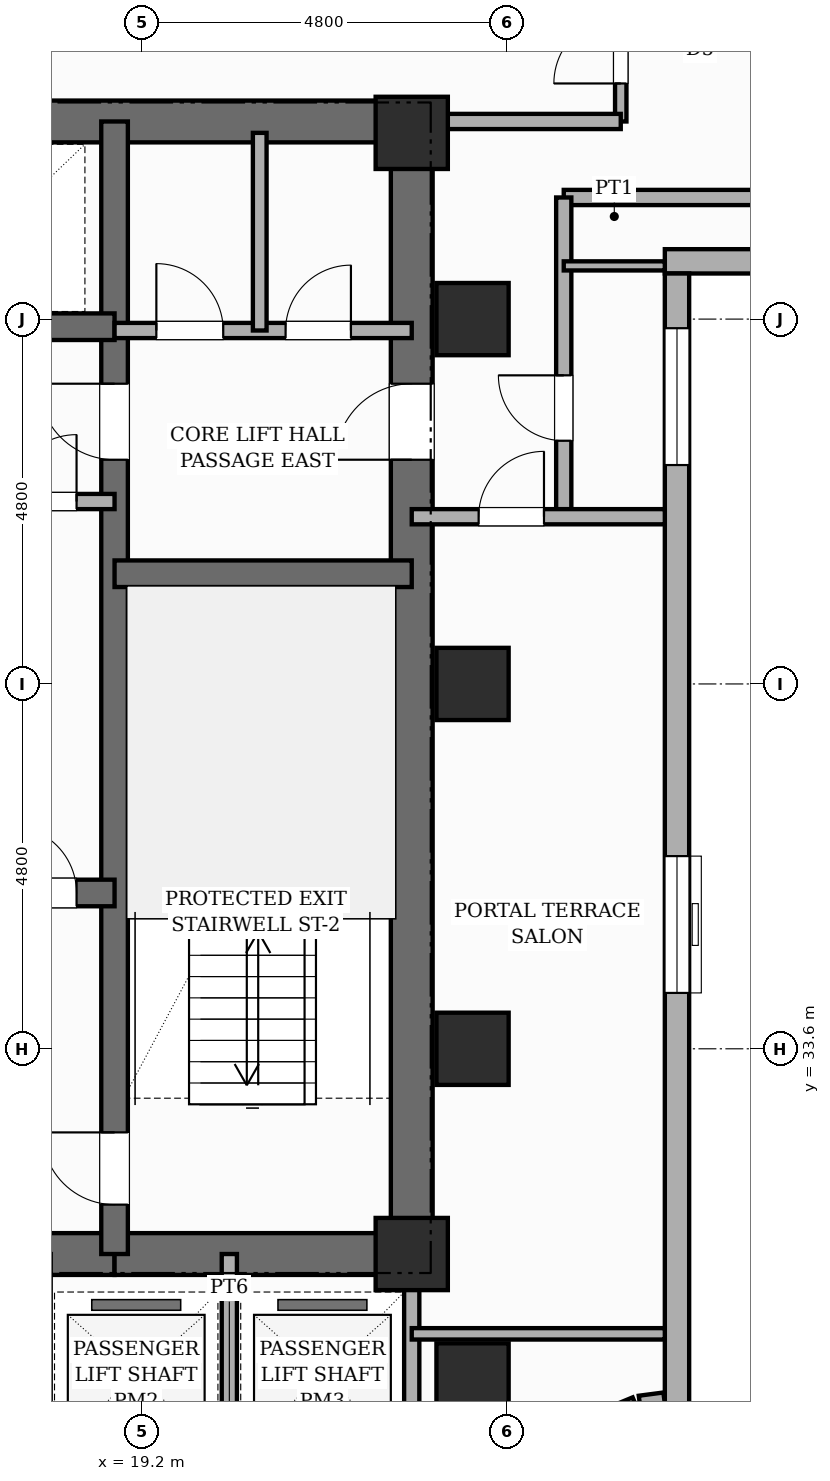
"""IFC4 building model, lengths in metres.
Left out: names, types, materials, properties, quantities, classifications, styles, units other than length and angle.
Written with IfcOpenShell. Run it as: python <this file> out.ifc"""

import sys

from ifc_helpers import new_model, si_unit, direction, frame, frame_2d, origin, origin_2d, place, context, subcontext, project, spatial, rectangle, extrude, element, fill, save


model = new_model("IFC4")
c1 = context("Model", 3, precision=1e-05, world=origin(), true_north=direction((0.0, 1.0)))
c2 = subcontext(c1, "Body", "Model", "MODEL_VIEW")
j1 = project(units=[si_unit("LENGTHUNIT", "METRE"), si_unit("PLANEANGLEUNIT", "RADIAN")], contexts=[c1])
p1 = place(None, origin())
s1 = spatial("IfcSite", under=j1, at=p1, CompositionType="ELEMENT")
p2 = place(p1, origin())
s2 = spatial("IfcBuilding", under=s1, at=p2, CompositionType="ELEMENT")
p3 = place(p2, frame((0.0, 0.0, 107.2)))
s3 = spatial("IfcBuildingStorey", under=s2, at=p3, CompositionType="ELEMENT", Elevation=107.2)
p4 = place(p3, frame((22.75, 30.625, 0.0), z_axis=(0.0, 0.0, 1.0), x_axis=(0.0, 1.0, 0.0)))
e1 = element("IfcWall", 1, at=p4, inside=s3, PredefinedType="SHEAR", context=c2, shape_type="SweptSolid", body=[
    extrude(rectangle(XDim=15.45, YDim=0.55, at=frame_2d((7.725, 0.0))), origin(), (0.0, 0.0, 1.0), 3.6),
])
p5 = place(p4, frame((10.725, 0.0, 0.0)))
e2 = element("IfcOpeningElement", 2, at=p5, cuts=e1, PredefinedType="OPENING", context=c2, shape_type="SweptSolid", body=[
    extrude(rectangle(XDim=1.0, YDim=2.15, at=frame_2d((0.5, 1.075))), frame((0.0, 0.285, 0.0), z_axis=(0.0, -1.0, 0.0), x_axis=(1.0, 0.0, 0.0)), (0.0, 0.0, 1.0), 0.57),
])
p6 = place(p3, frame((6.05, 45.8, 0.0), z_axis=(0.0, 0.0, 1.0), x_axis=(1.0, 0.0, 0.0)))
e3 = element("IfcWall", 3, at=p6, inside=s3, PredefinedType="SHEAR", context=c2, shape_type="SweptSolid", body=[
    extrude(rectangle(XDim=16.7, YDim=0.55, at=frame_2d((8.35, 0.0))), origin(), (0.0, 0.0, 1.0), 3.6),
])
p7 = place(p3, frame((9.96, 30.9, 0.0), z_axis=(0.0, 0.0, 1.0), x_axis=(1.0, 0.0, 0.0)))
e4 = element("IfcWall", 4, at=p7, inside=s3, PredefinedType="SHEAR", context=c2, shape_type="SweptSolid", body=[
    extrude(rectangle(XDim=8.88, YDim=0.55, at=frame_2d((4.44, 0.0))), origin(), (0.0, 0.0, 1.0), 3.6),
])
p8 = place(p7, frame((4.09, 0.0, 0.0)))
e5 = element("IfcOpeningElement", 5, at=p8, cuts=e4, PredefinedType="OPENING", context=c2, shape_type="SweptSolid", body=[
    extrude(rectangle(XDim=1.0, YDim=2.15, at=frame_2d((0.5, 1.075))), frame((0.0, 0.285, 0.0), z_axis=(0.0, -1.0, 0.0), x_axis=(1.0, 0.0, 0.0)), (0.0, 0.0, 1.0), 0.57),
])
p9 = place(p3, frame((18.84, 30.9, 0.0), z_axis=(0.0, 0.0, 1.0), x_axis=(1.0, 0.0, 0.0)))
e6 = element("IfcWall", 6, at=p9, inside=s3, PredefinedType="SHEAR", context=c2, shape_type="SweptSolid", body=[
    extrude(rectangle(XDim=3.91, YDim=0.55, at=frame_2d((1.955, 0.0))), origin(), (0.0, 0.0, 1.0), 3.6),
])
p10 = place(p3, frame((18.84, 30.9, 0.0), z_axis=(0.0, 0.0, 1.0), x_axis=(0.0, 1.0, 0.0)))
e7 = element("IfcWall", 7, at=p10, inside=s3, PredefinedType="SHEAR", context=c2, shape_type="SweptSolid", body=[
    extrude(rectangle(XDim=14.9, YDim=0.35, at=frame_2d((7.45, 0.0))), origin(), (0.0, 0.0, 1.0), 3.6),
])
p11 = place(p10, frame((0.65, 0.0, 0.0)))
e8 = element("IfcOpeningElement", 8, at=p11, cuts=e7, PredefinedType="OPENING", context=c2, shape_type="SweptSolid", body=[
    extrude(rectangle(XDim=0.95, YDim=2.1, at=frame_2d((0.475, 1.05))), frame((0.0, 0.185, 0.0), z_axis=(0.0, -1.0, 0.0), x_axis=(1.0, 0.0, 0.0)), (0.0, 0.0, 1.0), 0.37),
])
p12 = place(p10, frame((10.45, 0.0, 0.0)))
e9 = element("IfcOpeningElement", 9, at=p12, cuts=e7, PredefinedType="OPENING", context=c2, shape_type="SweptSolid", body=[
    extrude(rectangle(XDim=1.0, YDim=2.15, at=frame_2d((0.5, 1.075))), frame((0.0, 0.185, 0.0), z_axis=(0.0, -1.0, 0.0), x_axis=(1.0, 0.0, 0.0)), (0.0, 0.0, 1.0), 0.37),
])
p13 = place(p3, frame((18.84, 39.85, 0.0), z_axis=(0.0, 0.0, 1.0), x_axis=(1.0, 0.0, 0.0)))
e10 = element("IfcWall", 10, at=p13, inside=s3, PredefinedType="SHEAR", context=c2, shape_type="SweptSolid", body=[
    extrude(rectangle(XDim=3.91, YDim=0.35, at=frame_2d((1.955, 0.0))), origin(), (0.0, 0.0, 1.0), 3.6),
])
p14 = place(p3, frame((9.96, 35.65, 0.0), z_axis=(0.0, 0.0, 1.0), x_axis=(1.0, 0.0, 0.0)))
e11 = element("IfcWall", 11, at=p14, inside=s3, PredefinedType="SHEAR", context=c2, shape_type="SweptSolid", body=[
    extrude(rectangle(XDim=8.88, YDim=0.35, at=frame_2d((4.44, 0.0))), origin(), (0.0, 0.0, 1.0), 3.6),
])
p15 = place(p14, frame((0.84, 0.0, 0.0)))
e12 = element("IfcOpeningElement", 12, at=p15, cuts=e11, PredefinedType="OPENING", context=c2, shape_type="SweptSolid", body=[
    extrude(rectangle(XDim=1.1, YDim=2.15, at=frame_2d((0.55, 1.075))), frame((0.0, 0.185, 0.0), z_axis=(0.0, -1.0, 0.0), x_axis=(1.0, 0.0, 0.0)), (0.0, 0.0, 1.0), 0.37),
])
p16 = place(p14, frame((5.24, 0.0, 0.0)))
e13 = element("IfcOpeningElement", 13, at=p16, cuts=e11, PredefinedType="OPENING", context=c2, shape_type="SweptSolid", body=[
    extrude(rectangle(XDim=1.1, YDim=2.15, at=frame_2d((0.55, 1.075))), frame((0.0, 0.185, 0.0), z_axis=(0.0, -1.0, 0.0), x_axis=(1.0, 0.0, 0.0)), (0.0, 0.0, 1.0), 0.37),
])
p17 = place(p14, frame((7.5, 0.0, 0.0)))
e14 = element("IfcOpeningElement", 14, at=p17, cuts=e11, PredefinedType="OPENING", context=c2, shape_type="SweptSolid", body=[
    extrude(rectangle(XDim=0.88, YDim=2.1, at=frame_2d((0.44, 1.05))), frame((0.0, 0.185, 0.0), z_axis=(0.0, -1.0, 0.0), x_axis=(1.0, 0.0, 0.0)), (0.0, 0.0, 1.0), 0.37),
])
p18 = place(p3, frame((9.96, 43.1, 0.0), z_axis=(0.0, 0.0, 1.0), x_axis=(1.0, 0.0, 0.0)))
e15 = element("IfcWall", 15, at=p18, inside=s3, PredefinedType="SHEAR", context=c2, shape_type="SweptSolid", body=[
    extrude(rectangle(XDim=8.88, YDim=0.35, at=frame_2d((4.44, 0.0))), origin(), (0.0, 0.0, 1.0), 3.6),
])
for number, where, z_axis, x_axis in (
    (16, (22.75, 30.9, 0.0), (0.0, 0.0, 1.0), (1.0, 0.0, 0.0)),
    (17, (22.75, 45.65, 0.0), (0.0, 0.0, 1.0), (1.0, 0.0, 0.0)),
    (18, (23.55, 29.25, 0.0), (0.0, 0.0, 1.0), (1.0, 0.0, 0.0)),
    (19, (23.55, 33.6, 0.0), (0.0, 0.0, 1.0), (1.0, 0.0, 0.0)),
    (20, (23.55, 38.4, 0.0), (0.0, 0.0, 1.0), (1.0, 0.0, 0.0)),
    (21, (23.55, 43.2, 0.0), (0.0, 0.0, 1.0), (1.0, 0.0, 0.0)),
):
    element("IfcColumn", number, at=place(p3, frame(where, z_axis=z_axis, x_axis=x_axis)), inside=s3, PredefinedType="COLUMN", context=c2, shape_type="SweptSolid", body=[
        extrude(rectangle(XDim=0.95, YDim=0.95, at=origin_2d()), origin(), (0.0, 0.0, 1.0), 3.6),
    ])
p19 = place(p3, frame((38.4, 43.96, 0.0), z_axis=(0.0, 0.0, 1.0), x_axis=(-1.0, 0.0, 0.0)))
e22 = element("IfcWall", 22, at=p19, inside=s3, PredefinedType="STANDARD", context=c2, shape_type="SweptSolid", body=[
    extrude(rectangle(XDim=12.32, YDim=0.32, at=frame_2d((6.16, 0.0))), origin(), (0.0, 0.0, 1.0), 3.36),
])
p20 = place(p19, frame((5.26, 0.0, 0.8)))
e23 = element("IfcOpeningElement", 23, at=p20, cuts=e22, PredefinedType="OPENING", context=c2, shape_type="SweptSolid", body=[
    extrude(rectangle(XDim=1.8, YDim=2.1, at=frame_2d((0.9, 1.05))), frame((0.0, 0.17, 0.0), z_axis=(0.0, -1.0, 0.0), x_axis=(1.0, 0.0, 0.0)), (0.0, 0.0, 1.0), 0.34),
])
p21 = place(p3, frame((26.24, 43.8, 0.0), z_axis=(0.0, 0.0, 1.0), x_axis=(0.0, -1.0, 0.0)))
e24 = element("IfcWall", 24, at=p21, inside=s3, PredefinedType="STANDARD", context=c2, shape_type="SweptSolid", body=[
    extrude(rectangle(XDim=15.0, YDim=0.32, at=frame_2d((7.5, 0.0))), origin(), (0.0, 0.0, 1.0), 3.36),
])
p22 = place(p21, frame((7.665, 0.0, 0.8)))
e25 = element("IfcOpeningElement", 25, at=p22, cuts=e24, PredefinedType="OPENING", context=c2, shape_type="SweptSolid", body=[
    extrude(rectangle(XDim=1.8, YDim=2.1, at=frame_2d((0.9, 1.05))), frame((0.0, 0.17, 0.0), z_axis=(0.0, -1.0, 0.0), x_axis=(1.0, 0.0, 0.0)), (0.0, 0.0, 1.0), 0.34),
])
p23 = place(p21, frame((0.72, 0.0, 0.8)))
e26 = element("IfcOpeningElement", 26, at=p23, cuts=e24, PredefinedType="OPENING", context=c2, shape_type="SweptSolid", body=[
    extrude(rectangle(XDim=1.8, YDim=2.1, at=frame_2d((0.9, 1.05))), frame((0.0, 0.17, 0.0), z_axis=(0.0, -1.0, 0.0), x_axis=(1.0, 0.0, 0.0)), (0.0, 0.0, 1.0), 0.34),
])
p24 = place(p3, frame((26.082, 28.919, 0.0), z_axis=(0.0, 0.0, 1.0), x_axis=(-0.991512688813, -0.130009953168, 0.0)))
e27 = element("IfcWall", 27, at=p24, inside=s3, PredefinedType="STANDARD", context=c2, shape_type="SweptSolid", body=[
    extrude(rectangle(XDim=0.327, YDim=0.32, at=frame_2d((0.163, 0.0))), origin(), (0.0, 0.0, 1.0), 1.78),
])
p25 = place(p3, frame((25.718, 28.866, 0.0), z_axis=(0.0, 0.0, 1.0), x_axis=(-0.923836271867, -0.382787856107, 0.0)))
e28 = element("IfcWall", 28, at=p25, inside=s3, PredefinedType="STANDARD", context=c2, shape_type="SweptSolid", body=[
    extrude(rectangle(XDim=0.626, YDim=0.32, at=frame_2d((0.313, 0.0))), origin(), (0.0, 0.0, 1.0), 1.78),
])
p26 = place(p3, frame((9.96, 40.8, 0.0), z_axis=(0.0, 0.0, 1.0), x_axis=(1.0, 0.0, 0.0)))
e29 = element("IfcWall", 29, at=p26, inside=s3, PredefinedType="POLYGONAL", context=c2, shape_type="SweptSolid", body=[
    extrude(rectangle(XDim=8.88, YDim=0.2, at=frame_2d((4.44, 0.0))), origin(), (0.0, 0.0, 1.0), 3.36),
])
p27 = place(p26, frame((7.5, 0.0, 0.0)))
e30 = element("IfcOpeningElement", 30, at=p27, cuts=e29, PredefinedType="OPENING", context=c2, shape_type="SweptSolid", body=[
    extrude(rectangle(XDim=0.88, YDim=2.1, at=frame_2d((0.44, 1.05))), frame((0.0, 0.11, 0.0), z_axis=(0.0, -1.0, 0.0), x_axis=(1.0, 0.0, 0.0)), (0.0, 0.0, 1.0), 0.22),
])
p28 = place(p26, frame((3.6, 0.0, 0.0)))
e31 = element("IfcOpeningElement", 31, at=p28, cuts=e29, PredefinedType="OPENING", context=c2, shape_type="SweptSolid", body=[
    extrude(rectangle(XDim=0.88, YDim=2.1, at=frame_2d((0.44, 1.05))), frame((0.0, 0.11, 0.0), z_axis=(0.0, -1.0, 0.0), x_axis=(1.0, 0.0, 0.0)), (0.0, 0.0, 1.0), 0.22),
])
p29 = place(p3, frame((18.84, 43.05, 0.0), z_axis=(0.0, 0.0, 1.0), x_axis=(1.0, 0.0, 0.0)))
e32 = element("IfcWall", 32, at=p29, inside=s3, PredefinedType="POLYGONAL", context=c2, shape_type="SweptSolid", body=[
    extrude(rectangle(XDim=3.91, YDim=0.2, at=frame_2d((1.955, 0.0))), origin(), (0.0, 0.0, 1.0), 2.54),
])
p30 = place(p29, frame((0.55, 0.0, 0.0)))
e33 = element("IfcOpeningElement", 33, at=p30, cuts=e32, PredefinedType="OPENING", context=c2, shape_type="SweptSolid", body=[
    extrude(rectangle(XDim=0.88, YDim=2.1, at=frame_2d((0.44, 1.05))), frame((0.0, 0.11, 0.0), z_axis=(0.0, -1.0, 0.0), x_axis=(1.0, 0.0, 0.0)), (0.0, 0.0, 1.0), 0.22),
])
p31 = place(p29, frame((2.25, 0.0, 0.0)))
e34 = element("IfcOpeningElement", 34, at=p31, cuts=e32, PredefinedType="OPENING", context=c2, shape_type="SweptSolid", body=[
    extrude(rectangle(XDim=0.86, YDim=2.1, at=frame_2d((0.43, 1.05))), frame((0.0, 0.11, 0.0), z_axis=(0.0, -1.0, 0.0), x_axis=(1.0, 0.0, 0.0)), (0.0, 0.0, 1.0), 0.22),
])
p32 = place(p3, frame((20.75, 43.05, 0.0), z_axis=(0.0, 0.0, 1.0), x_axis=(0.0, 1.0, 0.0)))
e35 = element("IfcWall", 35, at=p32, inside=s3, PredefinedType="PLUMBINGWALL", context=c2, shape_type="SweptSolid", body=[
    extrude(rectangle(XDim=2.6, YDim=0.18, at=frame_2d((1.3, 0.0))), origin(), (0.0, 0.0, 1.0), 3.36),
])
p33 = place(p3, frame((22.75, 27.9, 0.0), z_axis=(0.0, 0.0, 1.0), x_axis=(0.0, 1.0, 0.0)))
e36 = element("IfcWall", 36, at=p33, inside=s3, PredefinedType="POLYGONAL", context=c2, shape_type="SweptSolid", body=[
    extrude(rectangle(XDim=3.0, YDim=0.2, at=frame_2d((1.5, 0.0))), origin(), (0.0, 0.0, 1.0), 3.36),
])
p34 = place(p3, frame((20.35, 28.0, 0.0), z_axis=(0.0, 0.0, 1.0), x_axis=(0.0, 1.0, 0.0)))
e37 = element("IfcWall", 37, at=p34, inside=s3, PredefinedType="POLYGONAL", context=c2, shape_type="SweptSolid", body=[
    extrude(rectangle(XDim=2.9, YDim=0.2, at=frame_2d((1.45, 0.0))), origin(), (0.0, 0.0, 1.0), 3.36),
])
p35 = place(p3, frame((25.5, 45.8, 0.0), z_axis=(0.0, 0.0, 1.0), x_axis=(0.0, 1.0, 0.0)))
e38 = element("IfcWall", 38, at=p35, inside=s3, PredefinedType="PARTITIONING", context=c2, shape_type="SweptSolid", body=[
    extrude(rectangle(XDim=1.88, YDim=0.15, at=frame_2d((0.94, 0.0))), origin(), (0.0, 0.0, 1.0), 3.36),
])
p36 = place(p35, frame((0.5, 0.0, 0.0)))
e39 = element("IfcOpeningElement", 39, at=p36, cuts=e38, PredefinedType="OPENING", context=c2, shape_type="SweptSolid", body=[
    extrude(rectangle(XDim=0.88, YDim=2.1, at=frame_2d((0.44, 1.05))), frame((0.0, 0.085, 0.0), z_axis=(0.0, -1.0, 0.0), x_axis=(1.0, 0.0, 0.0)), (0.0, 0.0, 1.0), 0.17),
])
p37 = place(p3, frame((22.75, 45.8, 0.0), z_axis=(0.0, 0.0, 1.0), x_axis=(1.0, 0.0, 0.0)))
e40 = element("IfcWall", 40, at=p37, inside=s3, PredefinedType="PARTITIONING", context=c2, shape_type="SweptSolid", body=[
    extrude(rectangle(XDim=2.75, YDim=0.2, at=frame_2d((1.375, 0.0))), origin(), (0.0, 0.0, 1.0), 3.36),
])
p38 = place(p3, frame((24.75, 44.8, 0.0), z_axis=(0.0, 0.0, 1.0), x_axis=(1.0, 0.0, 0.0)))
e41 = element("IfcWall", 41, at=p38, inside=s3, PredefinedType="PARTITIONING", context=c2, shape_type="SweptSolid", body=[
    extrude(rectangle(XDim=17.3, YDim=0.2, at=frame_2d((8.65, 0.0))), origin(), (0.0, 0.0, 1.0), 3.36),
])
p39 = place(p38, frame((6.2, 0.0, 0.0)))
e42 = element("IfcOpeningElement", 42, at=p39, cuts=e41, PredefinedType="OPENING", context=c2, shape_type="SweptSolid", body=[
    extrude(rectangle(XDim=0.95, YDim=2.15, at=frame_2d((0.475, 1.075))), frame((0.0, 0.11, 0.0), z_axis=(0.0, -1.0, 0.0), x_axis=(1.0, 0.0, 0.0)), (0.0, 0.0, 1.0), 0.22),
])
p40 = place(p3, frame((24.75, 40.6, 0.0), z_axis=(0.0, 0.0, 1.0), x_axis=(0.0, 1.0, 0.0)))
e43 = element("IfcWall", 43, at=p40, inside=s3, PredefinedType="PARTITIONING", context=c2, shape_type="SweptSolid", body=[
    extrude(rectangle(XDim=4.2, YDim=0.2, at=frame_2d((2.1, 0.0))), origin(), (0.0, 0.0, 1.0), 3.36),
])
p41 = place(p40, frame((1.0, 0.0, 0.0)))
e44 = element("IfcOpeningElement", 44, at=p41, cuts=e43, PredefinedType="OPENING", context=c2, shape_type="SweptSolid", body=[
    extrude(rectangle(XDim=0.86, YDim=2.1, at=frame_2d((0.43, 1.05))), frame((0.0, 0.11, 0.0), z_axis=(0.0, -1.0, 0.0), x_axis=(1.0, 0.0, 0.0)), (0.0, 0.0, 1.0), 0.22),
])
p42 = place(p3, frame((24.75, 43.9, 0.0), z_axis=(0.0, 0.0, 1.0), x_axis=(1.0, 0.0, 0.0)))
e45 = element("IfcWall", 45, at=p42, inside=s3, PredefinedType="PARTITIONING", context=c2, shape_type="SweptSolid", body=[
    extrude(rectangle(XDim=1.33, YDim=0.12, at=frame_2d((0.665, 0.0))), origin(), (0.0, 0.0, 1.0), 3.36),
])
p43 = place(p3, frame((22.75, 40.6, 0.0), z_axis=(0.0, 0.0, 1.0), x_axis=(1.0, 0.0, 0.0)))
e46 = element("IfcWall", 46, at=p43, inside=s3, PredefinedType="PARTITIONING", context=c2, shape_type="SweptSolid", body=[
    extrude(rectangle(XDim=3.33, YDim=0.2, at=frame_2d((1.665, 0.0))), origin(), (0.0, 0.0, 1.0), 3.36),
])
p44 = place(p43, frame((0.88, 0.0, 0.0)))
e47 = element("IfcOpeningElement", 47, at=p44, cuts=e46, PredefinedType="OPENING", context=c2, shape_type="SweptSolid", body=[
    extrude(rectangle(XDim=0.86, YDim=2.1, at=frame_2d((0.43, 1.05))), frame((0.0, 0.11, 0.0), z_axis=(0.0, -1.0, 0.0), x_axis=(1.0, 0.0, 0.0)), (0.0, 0.0, 1.0), 0.22),
])
p45 = place(p3, frame((22.75, 29.85, 0.0), z_axis=(0.0, 0.0, 1.0), x_axis=(1.0, 0.0, 0.0)))
e48 = element("IfcWall", 48, at=p45, inside=s3, PredefinedType="PARTITIONING", context=c2, shape_type="SweptSolid", body=[
    extrude(rectangle(XDim=3.33, YDim=0.15, at=frame_2d((1.665, 0.0))), origin(), (0.0, 0.0, 1.0), 1.78),
])
p46 = place(p22, origin())
e49 = element("IfcWindow", 49, at=p46, inside=s3, PartitioningType="SINGLE_PANEL", PredefinedType="WINDOW", context=c2, shape_type="SweptSolid", body=[
    extrude(rectangle(XDim=1.8, YDim=2.1, at=frame_2d((0.9, 1.05))), frame((0.0, 0.03, 0.0), z_axis=(0.0, -1.0, 0.0), x_axis=(1.0, 0.0, 0.0)), (0.0, 0.0, 1.0), 0.06),
])
fill(e25, e49)
p47 = place(p23, origin())
e50 = element("IfcWindow", 50, at=p47, inside=s3, PartitioningType="SINGLE_PANEL", PredefinedType="WINDOW", context=c2, shape_type="SweptSolid", body=[
    extrude(rectangle(XDim=1.8, YDim=2.1, at=frame_2d((0.9, 1.05))), frame((0.0, 0.03, 0.0), z_axis=(0.0, -1.0, 0.0), x_axis=(1.0, 0.0, 0.0)), (0.0, 0.0, 1.0), 0.06),
])
fill(e26, e50)
p48 = place(p11, origin())
e51 = element("IfcDoor", 51, at=p48, inside=s3, OperationType="SINGLE_SWING_RIGHT", PredefinedType="DOOR", context=c2, shape_type="SweptSolid", body=[
    extrude(rectangle(XDim=0.95, YDim=2.1, at=frame_2d((0.475, 1.05))), frame((0.0, 0.025, 0.0), z_axis=(0.0, -1.0, 0.0), x_axis=(1.0, 0.0, 0.0)), (0.0, 0.0, 1.0), 0.05),
])
fill(e8, e51)
p49 = place(p17, origin())
e52 = element("IfcDoor", 52, at=p49, inside=s3, OperationType="SINGLE_SWING_LEFT", PredefinedType="DOOR", context=c2, shape_type="SweptSolid", body=[
    extrude(rectangle(XDim=0.88, YDim=2.1, at=frame_2d((0.44, 1.05))), frame((0.0, 0.025, 0.0), z_axis=(0.0, -1.0, 0.0), x_axis=(1.0, 0.0, 0.0)), (0.0, 0.0, 1.0), 0.05),
])
fill(e14, e52)
p50 = place(p27, origin())
e53 = element("IfcDoor", 53, at=p50, inside=s3, OperationType="SINGLE_SWING_RIGHT", PredefinedType="DOOR", context=c2, shape_type="SweptSolid", body=[
    extrude(rectangle(XDim=0.88, YDim=2.1, at=frame_2d((0.44, 1.05))), frame((0.0, 0.025, 0.0), z_axis=(0.0, -1.0, 0.0), x_axis=(1.0, 0.0, 0.0)), (0.0, 0.0, 1.0), 0.05),
])
fill(e30, e53)
p51 = place(p12, origin())
e54 = element("IfcDoor", 54, at=p51, inside=s3, OperationType="SINGLE_SWING_RIGHT", PredefinedType="DOOR", context=c2, shape_type="SweptSolid", body=[
    extrude(rectangle(XDim=1.0, YDim=2.15, at=frame_2d((0.5, 1.075))), frame((0.0, 0.025, 0.0), z_axis=(0.0, -1.0, 0.0), x_axis=(1.0, 0.0, 0.0)), (0.0, 0.0, 1.0), 0.05),
])
fill(e9, e54)
p52 = place(p5, origin())
e55 = element("IfcDoor", 55, at=p52, inside=s3, OperationType="SINGLE_SWING_LEFT", PredefinedType="DOOR", context=c2, shape_type="SweptSolid", body=[
    extrude(rectangle(XDim=1.0, YDim=2.15, at=frame_2d((0.5, 1.075))), frame((0.0, 0.025, 0.0), z_axis=(0.0, -1.0, 0.0), x_axis=(1.0, 0.0, 0.0)), (0.0, 0.0, 1.0), 0.05),
])
fill(e2, e55)
p53 = place(p30, origin())
e56 = element("IfcDoor", 56, at=p53, inside=s3, OperationType="SINGLE_SWING_LEFT", PredefinedType="DOOR", context=c2, shape_type="SweptSolid", body=[
    extrude(rectangle(XDim=0.88, YDim=2.1, at=frame_2d((0.44, 1.05))), frame((0.0, 0.025, 0.0), z_axis=(0.0, -1.0, 0.0), x_axis=(1.0, 0.0, 0.0)), (0.0, 0.0, 1.0), 0.05),
])
fill(e33, e56)
p54 = place(p31, origin())
e57 = element("IfcDoor", 57, at=p54, inside=s3, OperationType="SINGLE_SWING_RIGHT", PredefinedType="DOOR", context=c2, shape_type="SweptSolid", body=[
    extrude(rectangle(XDim=0.86, YDim=2.1, at=frame_2d((0.43, 1.05))), frame((0.0, 0.025, 0.0), z_axis=(0.0, -1.0, 0.0), x_axis=(1.0, 0.0, 0.0)), (0.0, 0.0, 1.0), 0.05),
])
fill(e34, e57)
p55 = place(p36, origin())
e58 = element("IfcDoor", 58, at=p55, inside=s3, OperationType="SINGLE_SWING_LEFT", PredefinedType="DOOR", context=c2, shape_type="SweptSolid", body=[
    extrude(rectangle(XDim=0.88, YDim=2.1, at=frame_2d((0.44, 1.05))), frame((0.0, 0.025, 0.0), z_axis=(0.0, -1.0, 0.0), x_axis=(1.0, 0.0, 0.0)), (0.0, 0.0, 1.0), 0.05),
])
fill(e39, e58)
p56 = place(p41, origin())
e59 = element("IfcDoor", 59, at=p56, inside=s3, OperationType="SINGLE_SWING_RIGHT", PredefinedType="DOOR", context=c2, shape_type="SweptSolid", body=[
    extrude(rectangle(XDim=0.86, YDim=2.1, at=frame_2d((0.43, 1.05))), frame((0.0, 0.025, 0.0), z_axis=(0.0, -1.0, 0.0), x_axis=(1.0, 0.0, 0.0)), (0.0, 0.0, 1.0), 0.05),
])
fill(e44, e59)
p57 = place(p44, origin())
e60 = element("IfcDoor", 60, at=p57, inside=s3, OperationType="SINGLE_SWING_RIGHT", PredefinedType="DOOR", context=c2, shape_type="SweptSolid", body=[
    extrude(rectangle(XDim=0.86, YDim=2.1, at=frame_2d((0.43, 1.05))), frame((0.0, 0.025, 0.0), z_axis=(0.0, -1.0, 0.0), x_axis=(1.0, 0.0, 0.0)), (0.0, 0.0, 1.0), 0.05),
])
fill(e47, e60)
save(model, sys.argv[1])
